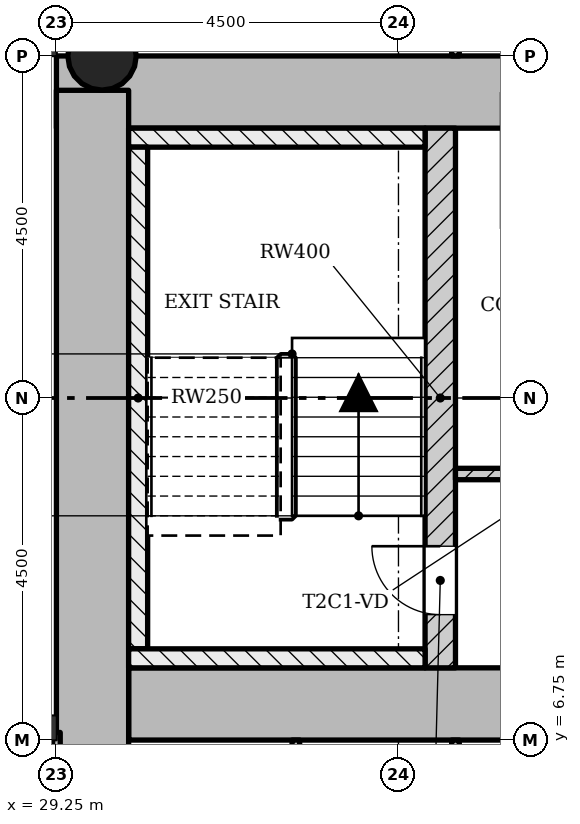
"""IFC4 building model, lengths in metres.
Left out: names, types, materials, properties, quantities, classifications, styles, units other than length and angle.
Written with IfcOpenShell. Run it as: python <this file> out.ifc"""

import sys

from ifc_helpers import new_model, si_unit, direction, frame, frame_2d, origin, origin_2d, place, context, subcontext, project, spatial, rectangle, hollow_circle, extrude, element, fill, save


model = new_model("IFC4")
c1 = context("Model", 3, precision=1e-05, world=origin(), true_north=direction((0.0, 1.0)))
c2 = subcontext(c1, "Body", "Model", "MODEL_VIEW")
j1 = project(units=[si_unit("LENGTHUNIT", "METRE"), si_unit("PLANEANGLEUNIT", "RADIAN")], contexts=[c1])
p1 = place(None, origin())
s1 = spatial("IfcSite", under=j1, at=p1, CompositionType="ELEMENT")
p2 = place(p1, origin())
s2 = spatial("IfcBuilding", under=s1, at=p2, CompositionType="ELEMENT")
p3 = place(p2, frame((0.0, 0.0, 90.2)))
s3 = spatial("IfcBuildingStorey", under=s2, at=p3, CompositionType="ELEMENT", Elevation=90.2)
p4 = place(p3, frame((30.2, 7.225, 0.0), z_axis=(0.0, 0.0, 1.0), x_axis=(1.0, 0.0, 0.0)))
e1 = element("IfcWall", 1, at=p4, inside=s3, PredefinedType="SHEAR", context=c2, shape_type="SweptSolid", body=[
    extrude(rectangle(XDim=12.55, YDim=0.95, at=frame_2d((6.275, 0.0))), origin(), (0.0, 0.0, 1.0), 3.4),
])
p5 = place(p4, frame((4.9, 0.0, 0.0)))
e2 = element("IfcOpeningElement", 2, at=p5, cuts=e1, PredefinedType="OPENING", context=c2, shape_type="SweptSolid", body=[
    extrude(rectangle(XDim=1.8, YDim=2.1, at=frame_2d((0.9, 1.05))), frame((0.0, 0.485, 0.0), z_axis=(0.0, -1.0, 0.0), x_axis=(1.0, 0.0, 0.0)), (0.0, 0.0, 1.0), 0.97),
])
p6 = place(p3, frame((41.8, 15.275, 0.0), z_axis=(0.0, 0.0, 1.0), x_axis=(-1.0, 0.0, 0.0)))
e3 = element("IfcWall", 3, at=p6, inside=s3, PredefinedType="SHEAR", context=c2, shape_type="SweptSolid", body=[
    extrude(rectangle(XDim=12.55, YDim=0.95, at=frame_2d((6.275, 0.0))), origin(), (0.0, 0.0, 1.0), 3.4),
])
p7 = place(p6, frame((4.9, 0.0, 0.0)))
e4 = element("IfcOpeningElement", 4, at=p7, cuts=e3, PredefinedType="OPENING", context=c2, shape_type="SweptSolid", body=[
    extrude(rectangle(XDim=1.8, YDim=2.1, at=frame_2d((0.9, 1.05))), frame((0.0, 0.485, 0.0), z_axis=(0.0, -1.0, 0.0), x_axis=(1.0, 0.0, 0.0)), (0.0, 0.0, 1.0), 0.97),
])
p8 = place(p3, frame((29.725, 15.298, 0.0), z_axis=(0.0, 0.0, 1.0), x_axis=(0.0, -1.0, 0.0)))
e5 = element("IfcWall", 5, at=p8, inside=s3, PredefinedType="SHEAR", context=c2, shape_type="SweptSolid", body=[
    extrude(rectangle(XDim=8.696, YDim=0.95, at=frame_2d((4.348, 0.0))), origin(), (0.0, 0.0, 1.0), 3.4),
])
p9 = place(p3, frame((34.3, 7.7, 0.0), z_axis=(0.0, 0.0, 1.0), x_axis=(0.0, 1.0, 0.0)))
e6 = element("IfcWall", 6, at=p9, inside=s3, PredefinedType="SHEAR", context=c2, shape_type="SweptSolid", body=[
    extrude(rectangle(XDim=7.1, YDim=0.4, at=frame_2d((3.55, 0.0))), origin(), (0.0, 0.0, 1.0), 3.4),
])
p10 = place(p9, frame((0.7, 0.0, 0.0)))
e7 = element("IfcOpeningElement", 7, at=p10, cuts=e6, PredefinedType="OPENING", context=c2, shape_type="SweptSolid", body=[
    extrude(rectangle(XDim=0.9, YDim=2.1, at=frame_2d((0.45, 1.05))), frame((0.0, 0.21, 0.0), z_axis=(0.0, -1.0, 0.0), x_axis=(1.0, 0.0, 0.0)), (0.0, 0.0, 1.0), 0.42),
])
p11 = place(p3, frame((29.85, 15.75, 0.0), z_axis=(0.0, 0.0, 1.0), x_axis=(1.0, 0.0, 0.0)))
e8 = element("IfcColumn", 8, at=p11, inside=s3, PredefinedType="COLUMN", context=c2, shape_type="SweptSolid", body=[
    extrude(hollow_circle(Radius=0.45, WallThickness=0.032, at=origin_2d()), origin(), (0.0, 0.0, 1.0), 3.4),
])
p12 = place(p3, frame((37.5, 10.25, 0.0), z_axis=(0.0, 0.0, 1.0), x_axis=(-1.0, 0.0, 0.0)))
e9 = element("IfcWall", 9, at=p12, inside=s3, PredefinedType="PARTITIONING", context=c2, shape_type="SweptSolid", body=[
    extrude(rectangle(XDim=3.0, YDim=0.15, at=frame_2d((1.5, 0.0))), origin(), (0.0, 0.0, 1.0), 3.0),
])
p13 = place(p12, frame((0.6, 0.0, 0.0)))
e10 = element("IfcOpeningElement", 10, at=p13, cuts=e9, PredefinedType="OPENING", context=c2, shape_type="SweptSolid", body=[
    extrude(rectangle(XDim=1.8, YDim=2.1, at=frame_2d((0.9, 1.05))), frame((0.0, 0.085, 0.0), z_axis=(0.0, -1.0, 0.0), x_axis=(1.0, 0.0, 0.0)), (0.0, 0.0, 1.0), 0.17),
])
p14 = place(p3, frame((34.5, 0.9, 0.0), z_axis=(0.0, 0.0, 1.0), x_axis=(0.0, 1.0, 0.0)))
e11 = element("IfcWall", 11, at=p14, inside=s3, PredefinedType="PARTITIONING", context=c2, shape_type="SweptSolid", body=[
    extrude(rectangle(XDim=5.85, YDim=0.1, at=frame_2d((2.925, 0.0))), origin(), (0.0, 0.0, 1.0), 3.0),
])
p15 = place(p14, frame((2.475, 0.0, 0.0)))
e12 = element("IfcOpeningElement", 12, at=p15, cuts=e11, PredefinedType="OPENING", context=c2, shape_type="SweptSolid", body=[
    extrude(rectangle(XDim=0.9, YDim=2.1, at=frame_2d((0.45, 1.05))), frame((0.0, 0.06, 0.0), z_axis=(0.0, -1.0, 0.0), x_axis=(1.0, 0.0, 0.0)), (0.0, 0.0, 1.0), 0.12),
])
p16 = place(p3, frame((34.5, 15.75, 0.0), z_axis=(0.0, 0.0, 1.0), x_axis=(0.0, 1.0, 0.0)))
e13 = element("IfcWall", 13, at=p16, inside=s3, PredefinedType="PARTITIONING", context=c2, shape_type="SweptSolid", body=[
    extrude(rectangle(XDim=4.5, YDim=0.1, at=frame_2d((2.25, 0.0))), origin(), (0.0, 0.0, 1.0), 3.0),
])
p17 = place(p16, frame((1.8, 0.0, 0.0)))
e14 = element("IfcOpeningElement", 14, at=p17, cuts=e13, PredefinedType="OPENING", context=c2, shape_type="SweptSolid", body=[
    extrude(rectangle(XDim=0.9, YDim=2.1, at=frame_2d((0.45, 1.05))), frame((0.0, 0.06, 0.0), z_axis=(0.0, -1.0, 0.0), x_axis=(1.0, 0.0, 0.0)), (0.0, 0.0, 1.0), 0.12),
])
p18 = place(p3, frame((32.4, 0.9, 0.0), z_axis=(0.0, 0.0, 1.0), x_axis=(0.0, 1.0, 0.0)))
e15 = element("IfcWall", 15, at=p18, inside=s3, PredefinedType="PARTITIONING", context=c2, shape_type="SweptSolid", body=[
    extrude(rectangle(XDim=5.85, YDim=0.1, at=frame_2d((2.925, 0.0))), origin(), (0.0, 0.0, 1.0), 3.0),
])
p19 = place(p3, frame((29.25, 0.9, 0.0), z_axis=(0.0, 0.0, 1.0), x_axis=(0.0, 1.0, 0.0)))
e16 = element("IfcWall", 16, at=p19, inside=s3, PredefinedType="PARTITIONING", context=c2, shape_type="SweptSolid", body=[
    extrude(rectangle(XDim=5.95, YDim=0.1, at=frame_2d((2.975, 0.0))), origin(), (0.0, 0.0, 1.0), 3.0),
])
p20 = place(p3, frame((34.1, 14.675, 0.0), z_axis=(0.0, 0.0, 1.0), x_axis=(-1.0, 0.0, 0.0)))
e17 = element("IfcWall", 17, at=p20, inside=s3, PredefinedType="SHEAR", context=c2, shape_type="SweptSolid", body=[
    extrude(rectangle(XDim=3.9, YDim=0.25, at=frame_2d((1.95, 0.0))), origin(), (0.0, 0.0, 1.0), 3.4),
])
p21 = place(p3, frame((30.325, 7.95, 0.0), z_axis=(0.0, 0.0, 1.0), x_axis=(0.0, 1.0, 0.0)))
e18 = element("IfcWall", 18, at=p21, inside=s3, PredefinedType="SHEAR", context=c2, shape_type="SweptSolid", body=[
    extrude(rectangle(XDim=6.6, YDim=0.25, at=frame_2d((3.3, 0.0))), origin(), (0.0, 0.0, 1.0), 3.4),
])
p22 = place(p3, frame((34.1, 7.825, 0.0), z_axis=(0.0, 0.0, 1.0), x_axis=(-1.0, 0.0, 0.0)))
e19 = element("IfcWall", 19, at=p22, inside=s3, PredefinedType="SHEAR", context=c2, shape_type="SweptSolid", body=[
    extrude(rectangle(XDim=3.9, YDim=0.25, at=frame_2d((1.95, 0.0))), origin(), (0.0, 0.0, 1.0), 3.4),
])
p23 = place(p13, origin())
e20 = element("IfcDoor", 20, at=p23, inside=s3, OperationType="SINGLE_SWING_LEFT", PredefinedType="DOOR", context=c2, shape_type="SweptSolid", body=[
    extrude(rectangle(XDim=1.8, YDim=2.1, at=frame_2d((0.9, 1.05))), frame((0.0, 0.025, 0.0), z_axis=(0.0, -1.0, 0.0), x_axis=(1.0, 0.0, 0.0)), (0.0, 0.0, 1.0), 0.05),
])
fill(e10, e20)
p24 = place(p10, origin())
e21 = element("IfcDoor", 21, at=p24, inside=s3, OperationType="SINGLE_SWING_LEFT", PredefinedType="DOOR", context=c2, shape_type="SweptSolid", body=[
    extrude(rectangle(XDim=0.9, YDim=2.1, at=frame_2d((0.45, 1.05))), frame((0.0, 0.025, 0.0), z_axis=(0.0, -1.0, 0.0), x_axis=(1.0, 0.0, 0.0)), (0.0, 0.0, 1.0), 0.05),
])
fill(e7, e21)
p25 = place(p5, origin())
e22 = element("IfcDoor", 22, at=p25, inside=s3, OperationType="SINGLE_SWING_LEFT", PredefinedType="DOOR", context=c2, shape_type="SweptSolid", body=[
    extrude(rectangle(XDim=1.8, YDim=2.1, at=frame_2d((0.9, 1.05))), frame((0.0, 0.025, 0.0), z_axis=(0.0, -1.0, 0.0), x_axis=(1.0, 0.0, 0.0)), (0.0, 0.0, 1.0), 0.05),
])
fill(e2, e22)
save(model, sys.argv[1])
